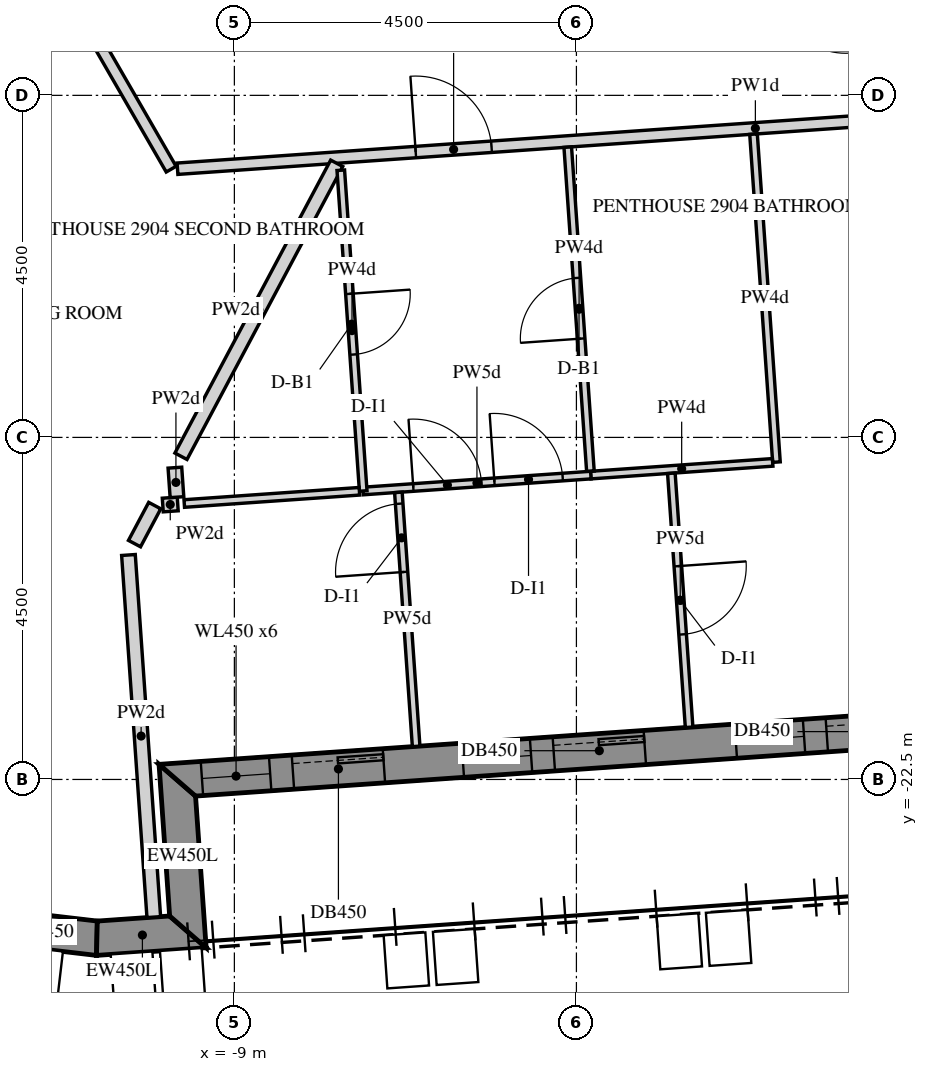
"""IFC4 building model, lengths in metres.
Left out: names, types, materials, properties, quantities, classifications, styles, units other than length and angle.
Written with IfcOpenShell. Run it as: python <this file> out.ifc"""

import sys

from ifc_helpers import new_model, si_unit, direction, frame, frame_2d, origin, place, context, subcontext, project, spatial, polyline, rectangle, outline, extrude, element, fill, save


model = new_model("IFC4")
c1 = context("Model", 3, precision=1e-05, world=origin(), true_north=direction((0.0, 1.0)))
c2 = subcontext(c1, "Body", "Model", "MODEL_VIEW")
j1 = project(units=[si_unit("LENGTHUNIT", "METRE"), si_unit("PLANEANGLEUNIT", "RADIAN")], contexts=[c1])
p1 = place(None, origin())
s1 = spatial("IfcSite", under=j1, at=p1, CompositionType="ELEMENT")
p2 = place(p1, origin())
s2 = spatial("IfcBuilding", under=s1, at=p2, CompositionType="ELEMENT")
p3 = place(p2, frame((0.0, 0.0, 369.0)))
s3 = spatial("IfcBuildingStorey", under=s2, at=p3, CompositionType="ELEMENT", Elevation=369.0)
p4 = place(p3, frame((-12.197, -24.427, -0.15), z_axis=(0.0, 0.0, 1.0), x_axis=(0.993227902261, -0.116182331575, 0.0)))
e1 = element("IfcWall", 1, at=p4, inside=s3, PredefinedType="SOLIDWALL", context=c2, shape_type="SweptSolid", body=[
    extrude(outline(polyline([(-0.042, -0.225), (1.418, -0.225), (1.376, 0.225), (0.042, 0.225), (-0.042, -0.225)])), origin(), (0.0, 0.0, 1.0), 3.9),
])
p5 = place(p3, frame((-10.809, -24.589, -0.15), z_axis=(0.0, 0.0, 1.0), x_axis=(0.997562933087, 0.069772448216, 0.0)))
e2 = element("IfcWall", 2, at=p5, inside=s3, PredefinedType="SOLIDWALL", context=c2, shape_type="SweptSolid", body=[
    extrude(outline(polyline([(-0.021, -0.225), (1.425, -0.225), (0.975, 0.225), (0.021, 0.225), (-0.021, -0.225)])), origin(), (0.0, 0.0, 1.0), 3.9),
])
p6 = place(p3, frame((-9.611, -24.505, -0.15), z_axis=(0.0, 0.0, 1.0), x_axis=(-0.069824268692, 0.99755930726, 0.0)))
e3 = element("IfcWall", 3, at=p6, inside=s3, PredefinedType="SOLIDWALL", context=c2, shape_type="SweptSolid", body=[
    extrude(outline(polyline([(-0.225, -0.225), (1.775, -0.225), (2.225, 0.225), (0.225, 0.225), (-0.225, -0.225)])), origin(), (0.0, 0.0, 1.0), 3.9),
])
p7 = place(p3, frame((-9.751, -22.51, -0.15), z_axis=(0.0, 0.0, 1.0), x_axis=(0.997564460173, 0.06975061147, 0.0)))
e4 = element("IfcWall", 4, at=p7, inside=s3, PredefinedType="SOLIDWALL", context=c2, shape_type="SweptSolid", body=[
    extrude(outline(polyline([(0.225, -0.225), (20.507, -0.225), (20.957, 0.225), (-0.225, 0.225), (0.225, -0.225)])), origin(), (0.0, 0.0, 1.0), 3.9),
])
p8 = place(p7, frame((0.325, 0.0, 1.05)))
e5 = element("IfcOpeningElement", 5, at=p8, cuts=e4, PredefinedType="OPENING", context=c2, shape_type="SweptSolid", body=[
    extrude(rectangle(XDim=0.9, YDim=1.5, at=frame_2d((0.45, 0.75))), frame((0.0, 0.235, 0.0), z_axis=(0.0, -1.0, 0.0), x_axis=(1.0, 0.0, 0.0)), (0.0, 0.0, 1.0), 0.47),
])
p9 = place(p7, frame((1.525, 0.0, 0.15)))
e6 = element("IfcOpeningElement", 6, at=p9, cuts=e4, PredefinedType="OPENING", context=c2, shape_type="SweptSolid", body=[
    extrude(rectangle(XDim=1.2, YDim=2.4, at=frame_2d((0.6, 1.2))), frame((0.0, 0.235, 0.0), z_axis=(0.0, -1.0, 0.0), x_axis=(1.0, 0.0, 0.0)), (0.0, 0.0, 1.0), 0.47),
])
p10 = place(p7, frame((3.766, 0.0, 1.05)))
e7 = element("IfcOpeningElement", 7, at=p10, cuts=e4, PredefinedType="OPENING", context=c2, shape_type="SweptSolid", body=[
    extrude(rectangle(XDim=0.9, YDim=1.5, at=frame_2d((0.45, 0.75))), frame((0.0, 0.235, 0.0), z_axis=(0.0, -1.0, 0.0), x_axis=(1.0, 0.0, 0.0)), (0.0, 0.0, 1.0), 0.47),
])
p11 = place(p7, frame((4.966, 0.0, 0.15)))
e8 = element("IfcOpeningElement", 8, at=p11, cuts=e4, PredefinedType="OPENING", context=c2, shape_type="SweptSolid", body=[
    extrude(rectangle(XDim=1.2, YDim=2.4, at=frame_2d((0.6, 1.2))), frame((0.0, 0.235, 0.0), z_axis=(0.0, -1.0, 0.0), x_axis=(1.0, 0.0, 0.0)), (0.0, 0.0, 1.0), 0.47),
])
p12 = place(p7, frame((7.366, 0.0, 1.05)))
e9 = element("IfcOpeningElement", 9, at=p12, cuts=e4, PredefinedType="OPENING", context=c2, shape_type="SweptSolid", body=[
    extrude(rectangle(XDim=0.9, YDim=1.5, at=frame_2d((0.45, 0.75))), frame((0.0, 0.235, 0.0), z_axis=(0.0, -1.0, 0.0), x_axis=(1.0, 0.0, 0.0)), (0.0, 0.0, 1.0), 0.47),
])
p13 = place(p7, frame((8.566, 0.0, 0.15)))
e10 = element("IfcOpeningElement", 10, at=p13, cuts=e4, PredefinedType="OPENING", context=c2, shape_type="SweptSolid", body=[
    extrude(rectangle(XDim=1.2, YDim=2.4, at=frame_2d((0.6, 1.2))), frame((0.0, 0.235, 0.0), z_axis=(0.0, -1.0, 0.0), x_axis=(1.0, 0.0, 0.0)), (0.0, 0.0, 1.0), 0.47),
])
p14 = place(p7, frame((10.966, 0.0, 1.05)))
e11 = element("IfcOpeningElement", 11, at=p14, cuts=e4, PredefinedType="OPENING", context=c2, shape_type="SweptSolid", body=[
    extrude(rectangle(XDim=0.9, YDim=1.5, at=frame_2d((0.45, 0.75))), frame((0.0, 0.235, 0.0), z_axis=(0.0, -1.0, 0.0), x_axis=(1.0, 0.0, 0.0)), (0.0, 0.0, 1.0), 0.47),
])
p15 = place(p7, frame((12.166, 0.0, 0.15)))
e12 = element("IfcOpeningElement", 12, at=p15, cuts=e4, PredefinedType="OPENING", context=c2, shape_type="SweptSolid", body=[
    extrude(rectangle(XDim=1.2, YDim=2.4, at=frame_2d((0.6, 1.2))), frame((0.0, 0.235, 0.0), z_axis=(0.0, -1.0, 0.0), x_axis=(1.0, 0.0, 0.0)), (0.0, 0.0, 1.0), 0.47),
])
p16 = place(p7, frame((14.566, 0.0, 1.05)))
e13 = element("IfcOpeningElement", 13, at=p16, cuts=e4, PredefinedType="OPENING", context=c2, shape_type="SweptSolid", body=[
    extrude(rectangle(XDim=0.9, YDim=1.5, at=frame_2d((0.45, 0.75))), frame((0.0, 0.235, 0.0), z_axis=(0.0, -1.0, 0.0), x_axis=(1.0, 0.0, 0.0)), (0.0, 0.0, 1.0), 0.47),
])
p17 = place(p7, frame((15.766, 0.0, 0.15)))
e14 = element("IfcOpeningElement", 14, at=p17, cuts=e4, PredefinedType="OPENING", context=c2, shape_type="SweptSolid", body=[
    extrude(rectangle(XDim=1.2, YDim=2.4, at=frame_2d((0.6, 1.2))), frame((0.0, 0.235, 0.0), z_axis=(0.0, -1.0, 0.0), x_axis=(1.0, 0.0, 0.0)), (0.0, 0.0, 1.0), 0.47),
])
p18 = place(p7, frame((18.007, 0.0, 1.05)))
e15 = element("IfcOpeningElement", 15, at=p18, cuts=e4, PredefinedType="OPENING", context=c2, shape_type="SweptSolid", body=[
    extrude(rectangle(XDim=0.9, YDim=1.5, at=frame_2d((0.45, 0.75))), frame((0.0, 0.235, 0.0), z_axis=(0.0, -1.0, 0.0), x_axis=(1.0, 0.0, 0.0)), (0.0, 0.0, 1.0), 0.47),
])
p19 = place(p7, frame((19.207, 0.0, 0.15)))
e16 = element("IfcOpeningElement", 16, at=p19, cuts=e4, PredefinedType="OPENING", context=c2, shape_type="SweptSolid", body=[
    extrude(rectangle(XDim=1.2, YDim=2.4, at=frame_2d((0.6, 1.2))), frame((0.0, 0.235, 0.0), z_axis=(0.0, -1.0, 0.0), x_axis=(1.0, 0.0, 0.0)), (0.0, 0.0, 1.0), 0.47),
])
p20 = place(p3, frame((-16.583, -2.777, 0.0), z_axis=(0.0, 0.0, 1.0), x_axis=(0.50000467473, -0.866022704811, 0.0)))
e17 = element("IfcWall", 17, at=p20, inside=s3, PredefinedType="PARTITIONING", context=c2, shape_type="SweptSolid", body=[
    extrude(rectangle(XDim=13.504, YDim=0.15, at=frame_2d((6.752, 0.0))), origin(), (0.0, 0.0, 1.0), 2.47),
])
p21 = place(p20, frame((0.925, 0.0, 0.0)))
e18 = element("IfcOpeningElement", 18, at=p21, cuts=e17, PredefinedType="OPENING", context=c2, shape_type="SweptSolid", body=[
    extrude(rectangle(XDim=1.0, YDim=2.1, at=frame_2d((0.5, 1.05))), frame((0.0, 0.085, 0.0), z_axis=(0.0, -1.0, 0.0), x_axis=(1.0, 0.0, 0.0)), (0.0, 0.0, 1.0), 0.17),
])
p22 = place(p3, frame((-9.749, -14.465, 0.0), z_axis=(0.0, 0.0, 1.0), x_axis=(0.997564252773, 0.069753577612, 0.0)))
e19 = element("IfcWall", 19, at=p22, inside=s3, PredefinedType="PARTITIONING", context=c2, shape_type="SweptSolid", body=[
    extrude(rectangle(XDim=15.243, YDim=0.15, at=frame_2d((7.621, 0.0))), origin(), (0.0, 0.0, 1.0), 2.47),
])
p23 = place(p22, frame((3.142, 0.0, 0.0)))
e20 = element("IfcOpeningElement", 20, at=p23, cuts=e19, PredefinedType="OPENING", context=c2, shape_type="SweptSolid", body=[
    extrude(rectangle(XDim=1.0, YDim=2.1, at=frame_2d((0.5, 1.05))), frame((0.0, 0.085, 0.0), z_axis=(0.0, -1.0, 0.0), x_axis=(1.0, 0.0, 0.0)), (0.0, 0.0, 1.0), 0.17),
])
p24 = place(p3, frame((-10.06, -24.311, 0.0), z_axis=(0.0, 0.0, 1.0), x_axis=(-0.069731958306, 0.997565764244, 0.0)))
e21 = element("IfcWall", 21, at=p24, inside=s3, PredefinedType="PARTITIONING", context=c2, shape_type="SweptSolid", body=[
    extrude(rectangle(XDim=4.776, YDim=0.18, at=frame_2d((2.388, 0.0))), origin(), (0.0, 0.0, 1.0), 2.47),
])
p25 = place(p3, frame((-10.314, -19.397, 0.0), z_axis=(0.0, 0.0, 1.0), x_axis=(0.469648701082, 0.882853383961, 0.0)))
e22 = element("IfcWall", 22, at=p25, inside=s3, PredefinedType="PARTITIONING", context=c2, shape_type="SweptSolid", body=[
    extrude(rectangle(XDim=0.567, YDim=0.18, at=frame_2d((0.283, 0.0))), origin(), (0.0, 0.0, 1.0), 2.47),
])
p26 = place(p3, frame((-9.942, -18.889, 0.0), z_axis=(0.0, 0.0, 1.0), x_axis=(0.997589087128, 0.069397501713, 0.0)))
e23 = element("IfcWall", 23, at=p26, inside=s3, PredefinedType="PARTITIONING", context=c2, shape_type="SweptSolid", body=[
    extrude(rectangle(XDim=0.197, YDim=0.18, at=frame_2d((0.099, 0.0))), origin(), (0.0, 0.0, 1.0), 2.47),
])
p27 = place(p3, frame((-9.755, -18.786, 0.0), z_axis=(0.0, 0.0, 1.0), x_axis=(-0.070266142985, 0.997528279875, 0.0)))
e24 = element("IfcWall", 24, at=p27, inside=s3, PredefinedType="PARTITIONING", context=c2, shape_type="SweptSolid", body=[
    extrude(rectangle(XDim=0.389, YDim=0.18, at=frame_2d((0.195, 0.0))), origin(), (0.0, 0.0, 1.0), 2.47),
])
p28 = place(p3, frame((-9.703, -18.248, 0.0), z_axis=(0.0, 0.0, 1.0), x_axis=(0.469490526632, 0.882937509342, 0.0)))
e25 = element("IfcWall", 25, at=p28, inside=s3, PredefinedType="PARTITIONING", context=c2, shape_type="SweptSolid", body=[
    extrude(rectangle(XDim=4.365, YDim=0.18, at=frame_2d((2.183, 0.0))), origin(), (0.0, 0.0, 1.0), 2.47),
])
p29 = place(p3, frame((-2.17, -14.01, 0.0), z_axis=(0.0, 0.0, 1.0), x_axis=(0.069770707097, -0.997563054865, 0.0)))
e26 = element("IfcWall", 26, at=p29, inside=s3, PredefinedType="PARTITIONING", context=c2, shape_type="SweptSolid", body=[
    extrude(rectangle(XDim=4.325, YDim=0.1, at=frame_2d((2.163, 0.0))), origin(), (0.0, 0.0, 1.0), 2.47),
])
p30 = place(p3, frame((-1.918, -18.328, 0.0), z_axis=(0.0, 0.0, 1.0), x_axis=(-0.997561942506, -0.06978660948, 0.0)))
e27 = element("IfcWall", 27, at=p30, inside=s3, PredefinedType="PARTITIONING", context=c2, shape_type="SweptSolid", body=[
    extrude(rectangle(XDim=2.4, YDim=0.1, at=frame_2d((1.2, 0.0))), origin(), (0.0, 0.0, 1.0), 2.47),
])
p31 = place(p3, frame((-3.251, -18.472, 0.0), z_axis=(0.0, 0.0, 1.0), x_axis=(0.069739930095, -0.997565206967, 0.0)))
e28 = element("IfcWall", 28, at=p31, inside=s3, PredefinedType="PARTITIONING", context=c2, shape_type="SweptSolid", body=[
    extrude(rectangle(XDim=3.35, YDim=0.1, at=frame_2d((1.675, 0.0))), origin(), (0.0, 0.0, 1.0), 2.47),
])
p32 = place(p31, frame((1.225, 0.0, 0.0)))
e29 = element("IfcOpeningElement", 29, at=p32, cuts=e28, PredefinedType="OPENING", context=c2, shape_type="SweptSolid", body=[
    extrude(rectangle(XDim=0.9, YDim=2.1, at=frame_2d((0.45, 1.05))), frame((0.0, 0.06, 0.0), z_axis=(0.0, -1.0, 0.0), x_axis=(1.0, 0.0, 0.0)), (0.0, 0.0, 1.0), 0.12),
])
p33 = place(p3, frame((-4.316, -18.446, 0.0), z_axis=(0.0, 0.0, 1.0), x_axis=(-0.069785937212, 0.997561989536, 0.0)))
e30 = element("IfcWall", 30, at=p33, inside=s3, PredefinedType="PARTITIONING", context=c2, shape_type="SweptSolid", body=[
    extrude(rectangle(XDim=4.275, YDim=0.1, at=frame_2d((2.138, 0.0))), origin(), (0.0, 0.0, 1.0), 2.47),
])
p34 = place(p33, frame((1.75, 0.0, 0.0)))
e31 = element("IfcOpeningElement", 31, at=p34, cuts=e30, PredefinedType="OPENING", context=c2, shape_type="SweptSolid", body=[
    extrude(rectangle(XDim=0.8, YDim=2.1, at=frame_2d((0.4, 1.05))), frame((0.0, 0.06, 0.0), z_axis=(0.0, -1.0, 0.0), x_axis=(1.0, 0.0, 0.0)), (0.0, 0.0, 1.0), 0.12),
])
p35 = place(p3, frame((-7.307, -18.705, 0.0), z_axis=(0.0, 0.0, 1.0), x_axis=(0.997565643132, 0.069733690876, 0.0)))
e32 = element("IfcWall", 32, at=p35, inside=s3, PredefinedType="PARTITIONING", context=c2, shape_type="SweptSolid", body=[
    extrude(rectangle(XDim=3.004, YDim=0.1, at=frame_2d((1.502, 0.0))), origin(), (0.0, 0.0, 1.0), 2.47),
])
p36 = place(p35, frame((0.662, 0.0, 0.0)))
e33 = element("IfcOpeningElement", 33, at=p36, cuts=e32, PredefinedType="OPENING", context=c2, shape_type="SweptSolid", body=[
    extrude(rectangle(XDim=0.9, YDim=2.1, at=frame_2d((0.45, 1.05))), frame((0.0, 0.06, 0.0), z_axis=(0.0, -1.0, 0.0), x_axis=(1.0, 0.0, 0.0)), (0.0, 0.0, 1.0), 0.12),
])
p37 = place(p35, frame((1.732, 0.0, 0.0)))
e34 = element("IfcOpeningElement", 34, at=p37, cuts=e32, PredefinedType="OPENING", context=c2, shape_type="SweptSolid", body=[
    extrude(rectangle(XDim=0.9, YDim=2.1, at=frame_2d((0.45, 1.05))), frame((0.0, 0.06, 0.0), z_axis=(0.0, -1.0, 0.0), x_axis=(1.0, 0.0, 0.0)), (0.0, 0.0, 1.0), 0.12),
])
p38 = place(p3, frame((-7.6, -14.485, 0.0), z_axis=(0.0, 0.0, 1.0), x_axis=(0.069778585231, -0.997562503828, 0.0)))
e35 = element("IfcWall", 35, at=p38, inside=s3, PredefinedType="PARTITIONING", context=c2, shape_type="SweptSolid", body=[
    extrude(rectangle(XDim=4.23, YDim=0.1, at=frame_2d((2.115, 0.0))), origin(), (0.0, 0.0, 1.0), 2.47),
])
p39 = place(p38, frame((1.63, 0.0, 0.0)))
e36 = element("IfcOpeningElement", 36, at=p39, cuts=e35, PredefinedType="OPENING", context=c2, shape_type="SweptSolid", body=[
    extrude(rectangle(XDim=0.8, YDim=2.1, at=frame_2d((0.4, 1.05))), frame((0.0, 0.06, 0.0), z_axis=(0.0, -1.0, 0.0), x_axis=(1.0, 0.0, 0.0)), (0.0, 0.0, 1.0), 0.12),
])
p40 = place(p3, frame((-6.609, -22.065, 0.0), z_axis=(0.0, 0.0, 1.0), x_axis=(-0.06974500028, 0.997564852496, 0.0)))
e37 = element("IfcWall", 37, at=p40, inside=s3, PredefinedType="PARTITIONING", context=c2, shape_type="SweptSolid", body=[
    extrude(rectangle(XDim=3.35, YDim=0.1, at=frame_2d((1.675, 0.0))), origin(), (0.0, 0.0, 1.0), 2.47),
])
p41 = place(p40, frame((2.3, 0.0, 0.0)))
e38 = element("IfcOpeningElement", 38, at=p41, cuts=e37, PredefinedType="OPENING", context=c2, shape_type="SweptSolid", body=[
    extrude(rectangle(XDim=0.9, YDim=2.1, at=frame_2d((0.45, 1.05))), frame((0.0, 0.06, 0.0), z_axis=(0.0, -1.0, 0.0), x_axis=(1.0, 0.0, 0.0)), (0.0, 0.0, 1.0), 0.12),
])
p42 = place(p3, frame((-7.355, -18.708, 0.0), z_axis=(0.0, 0.0, 1.0), x_axis=(-0.997556979038, -0.069857523376, 0.0)))
e39 = element("IfcWall", 39, at=p42, inside=s3, PredefinedType="PARTITIONING", context=c2, shape_type="SweptSolid", body=[
    extrude(rectangle(XDim=2.31, YDim=0.1, at=frame_2d((1.155, 0.0))), origin(), (0.0, 0.0, 1.0), 2.47),
])
p43 = place(p8, frame((0.0, 0.155, 0.0)))
e40 = element("IfcWindow", 40, at=p43, inside=s3, PartitioningType="SINGLE_PANEL", PredefinedType="WINDOW", context=c2, shape_type="SweptSolid", body=[
    extrude(rectangle(XDim=0.9, YDim=1.5, at=frame_2d((0.45, 0.75))), frame((0.0, 0.03, 0.0), z_axis=(0.0, -1.0, 0.0), x_axis=(1.0, 0.0, 0.0)), (0.0, 0.0, 1.0), 0.06),
])
fill(e5, e40)
p44 = place(p9, frame((0.0, 0.15, 0.0)))
e41 = element("IfcDoor", 41, at=p44, inside=s3, OperationType="SLIDING_TO_LEFT", PredefinedType="DOOR", context=c2, shape_type="SweptSolid", body=[
    extrude(rectangle(XDim=1.2, YDim=2.4, at=frame_2d((0.6, 1.2))), frame((0.0, 0.025, 0.0), z_axis=(0.0, -1.0, 0.0), x_axis=(1.0, 0.0, 0.0)), (0.0, 0.0, 1.0), 0.05),
])
fill(e6, e41)
p45 = place(p10, frame((0.0, 0.155, 0.0)))
e42 = element("IfcWindow", 42, at=p45, inside=s3, PartitioningType="SINGLE_PANEL", PredefinedType="WINDOW", context=c2, shape_type="SweptSolid", body=[
    extrude(rectangle(XDim=0.9, YDim=1.5, at=frame_2d((0.45, 0.75))), frame((0.0, 0.03, 0.0), z_axis=(0.0, -1.0, 0.0), x_axis=(1.0, 0.0, 0.0)), (0.0, 0.0, 1.0), 0.06),
])
fill(e7, e42)
p46 = place(p11, frame((0.0, 0.15, 0.0)))
e43 = element("IfcDoor", 43, at=p46, inside=s3, OperationType="SLIDING_TO_LEFT", PredefinedType="DOOR", context=c2, shape_type="SweptSolid", body=[
    extrude(rectangle(XDim=1.2, YDim=2.4, at=frame_2d((0.6, 1.2))), frame((0.0, 0.025, 0.0), z_axis=(0.0, -1.0, 0.0), x_axis=(1.0, 0.0, 0.0)), (0.0, 0.0, 1.0), 0.05),
])
fill(e8, e43)
p47 = place(p12, frame((0.0, 0.155, 0.0)))
e44 = element("IfcWindow", 44, at=p47, inside=s3, PartitioningType="SINGLE_PANEL", PredefinedType="WINDOW", context=c2, shape_type="SweptSolid", body=[
    extrude(rectangle(XDim=0.9, YDim=1.5, at=frame_2d((0.45, 0.75))), frame((0.0, 0.03, 0.0), z_axis=(0.0, -1.0, 0.0), x_axis=(1.0, 0.0, 0.0)), (0.0, 0.0, 1.0), 0.06),
])
fill(e9, e44)
p48 = place(p13, frame((0.0, 0.15, 0.0)))
e45 = element("IfcDoor", 45, at=p48, inside=s3, OperationType="SLIDING_TO_LEFT", PredefinedType="DOOR", context=c2, shape_type="SweptSolid", body=[
    extrude(rectangle(XDim=1.2, YDim=2.4, at=frame_2d((0.6, 1.2))), frame((0.0, 0.025, 0.0), z_axis=(0.0, -1.0, 0.0), x_axis=(1.0, 0.0, 0.0)), (0.0, 0.0, 1.0), 0.05),
])
fill(e10, e45)
p49 = place(p23, origin())
e46 = element("IfcDoor", 46, at=p49, inside=s3, OperationType="SINGLE_SWING_RIGHT", PredefinedType="DOOR", context=c2, shape_type="SweptSolid", body=[
    extrude(rectangle(XDim=1.0, YDim=2.1, at=frame_2d((0.5, 1.05))), frame((0.0, 0.025, 0.0), z_axis=(0.0, -1.0, 0.0), x_axis=(1.0, 0.0, 0.0)), (0.0, 0.0, 1.0), 0.05),
])
fill(e20, e46)
p50 = place(p34, origin())
e47 = element("IfcDoor", 47, at=p50, inside=s3, OperationType="SINGLE_SWING_LEFT", PredefinedType="DOOR", context=c2, shape_type="SweptSolid", body=[
    extrude(rectangle(XDim=0.8, YDim=2.1, at=frame_2d((0.4, 1.05))), frame((0.0, 0.025, 0.0), z_axis=(0.0, -1.0, 0.0), x_axis=(1.0, 0.0, 0.0)), (0.0, 0.0, 1.0), 0.05),
])
fill(e31, e47)
p51 = place(p36, origin())
e48 = element("IfcDoor", 48, at=p51, inside=s3, OperationType="SINGLE_SWING_LEFT", PredefinedType="DOOR", context=c2, shape_type="SweptSolid", body=[
    extrude(rectangle(XDim=0.9, YDim=2.1, at=frame_2d((0.45, 1.05))), frame((0.0, 0.025, 0.0), z_axis=(0.0, -1.0, 0.0), x_axis=(1.0, 0.0, 0.0)), (0.0, 0.0, 1.0), 0.05),
])
fill(e33, e48)
p52 = place(p41, origin())
e49 = element("IfcDoor", 49, at=p52, inside=s3, OperationType="SINGLE_SWING_RIGHT", PredefinedType="DOOR", context=c2, shape_type="SweptSolid", body=[
    extrude(rectangle(XDim=0.9, YDim=2.1, at=frame_2d((0.45, 1.05))), frame((0.0, 0.025, 0.0), z_axis=(0.0, -1.0, 0.0), x_axis=(1.0, 0.0, 0.0)), (0.0, 0.0, 1.0), 0.05),
])
fill(e38, e49)
p53 = place(p37, origin())
e50 = element("IfcDoor", 50, at=p53, inside=s3, OperationType="SINGLE_SWING_LEFT", PredefinedType="DOOR", context=c2, shape_type="SweptSolid", body=[
    extrude(rectangle(XDim=0.9, YDim=2.1, at=frame_2d((0.45, 1.05))), frame((0.0, 0.025, 0.0), z_axis=(0.0, -1.0, 0.0), x_axis=(1.0, 0.0, 0.0)), (0.0, 0.0, 1.0), 0.05),
])
fill(e34, e50)
p54 = place(p39, origin())
e51 = element("IfcDoor", 51, at=p54, inside=s3, OperationType="SINGLE_SWING_RIGHT", PredefinedType="DOOR", context=c2, shape_type="SweptSolid", body=[
    extrude(rectangle(XDim=0.8, YDim=2.1, at=frame_2d((0.4, 1.05))), frame((0.0, 0.025, 0.0), z_axis=(0.0, -1.0, 0.0), x_axis=(1.0, 0.0, 0.0)), (0.0, 0.0, 1.0), 0.05),
])
fill(e36, e51)
p55 = place(p32, origin())
e52 = element("IfcDoor", 52, at=p55, inside=s3, OperationType="SINGLE_SWING_RIGHT", PredefinedType="DOOR", context=c2, shape_type="SweptSolid", body=[
    extrude(rectangle(XDim=0.9, YDim=2.1, at=frame_2d((0.45, 1.05))), frame((0.0, 0.025, 0.0), z_axis=(0.0, -1.0, 0.0), x_axis=(1.0, 0.0, 0.0)), (0.0, 0.0, 1.0), 0.05),
])
fill(e29, e52)
save(model, sys.argv[1])
